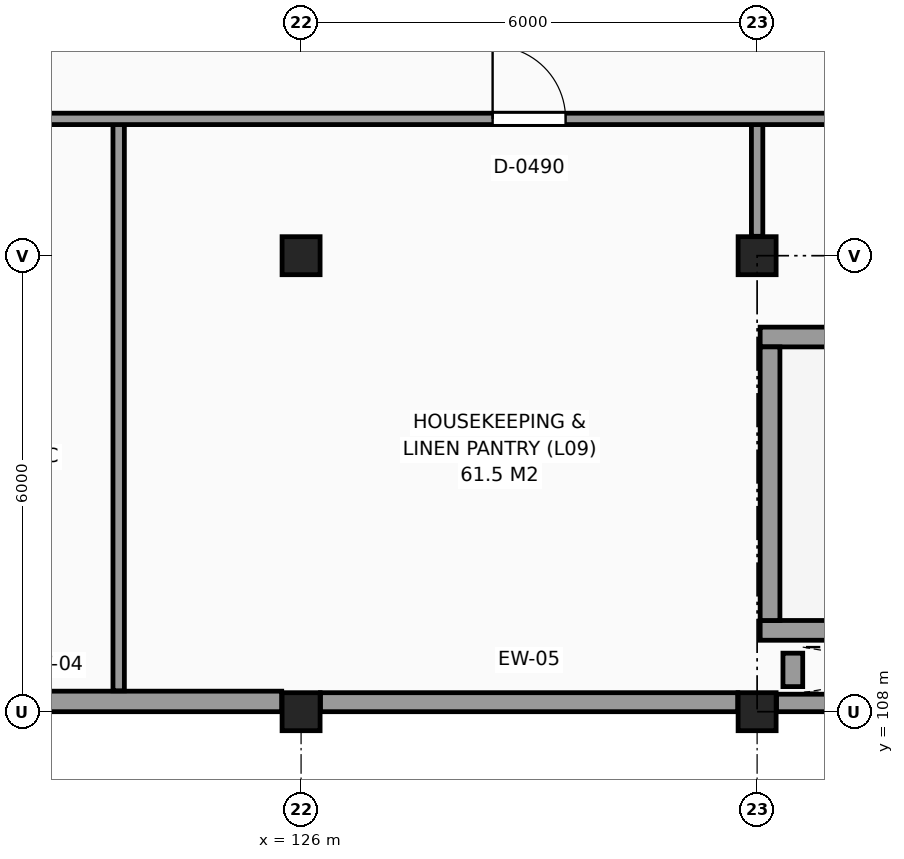
"""IFC4 building model, lengths in metres.
Left out: names, types, materials, properties, quantities, classifications, styles, units other than length and angle.
Written with IfcOpenShell. Run it as: python <this file> out.ifc"""

import sys

from ifc_helpers import new_model, si_unit, direction, frame, frame_2d, origin, origin_2d, place, context, subcontext, project, spatial, rectangle, extrude, element, fill, save


model = new_model("IFC4")
c1 = context("Model", 3, precision=1e-05, world=origin(), true_north=direction((0.0, 1.0)))
c2 = subcontext(c1, "Body", "Model", "MODEL_VIEW")
j1 = project(units=[si_unit("LENGTHUNIT", "METRE"), si_unit("PLANEANGLEUNIT", "RADIAN")], contexts=[c1])
p1 = place(None, origin())
s1 = spatial("IfcSite", under=j1, at=p1, CompositionType="ELEMENT")
p2 = place(p1, origin())
s2 = spatial("IfcBuilding", under=s1, at=p2, CompositionType="ELEMENT")
p3 = place(p2, frame((0.0, 0.0, 38.1)))
s3 = spatial("IfcBuildingStorey", under=s2, at=p3, CompositionType="ELEMENT", Elevation=38.1)
for number, where, z_axis, x_axis in (
    (1, (126.0, 108.0, 0.0), (0.0, 0.0, 1.0), (1.0, 0.0, 0.0)),
    (2, (126.0, 114.0, 0.0), (0.0, 0.0, 1.0), (1.0, 0.0, 0.0)),
    (3, (132.0, 108.0, 0.0), (0.0, 0.0, 1.0), (1.0, 0.0, 0.0)),
    (4, (132.0, 114.0, 0.0), (0.0, 0.0, 1.0), (1.0, 0.0, 0.0)),
):
    element("IfcColumn", number, at=place(p3, frame(where, z_axis=z_axis, x_axis=x_axis)), inside=s3, PredefinedType="COLUMN", context=c2, shape_type="SweptSolid", body=[
        extrude(rectangle(XDim=0.5, YDim=0.5, at=origin_2d()), origin(), (0.0, 0.0, 1.0), 3.3),
    ])
p4 = place(p3, frame((120.255, 108.135, 0.0), z_axis=(0.0, 0.0, 1.0), x_axis=(1.0, 0.0, 0.0)))
e5 = element("IfcWall", 5, at=p4, inside=s3, PredefinedType="SOLIDWALL", context=c2, shape_type="SweptSolid", body=[
    extrude(rectangle(XDim=5.49, YDim=0.27, at=frame_2d((2.745, 0.0))), origin(), (0.0, 0.0, 1.0), 2.41),
])
p5 = place(p3, frame((126.255, 108.125, 0.0), z_axis=(0.0, 0.0, 1.0), x_axis=(1.0, 0.0, 0.0)))
e6 = element("IfcWall", 6, at=p5, inside=s3, PredefinedType="SOLIDWALL", context=c2, shape_type="SweptSolid", body=[
    extrude(rectangle(XDim=5.49, YDim=0.25, at=frame_2d((2.745, 0.0))), origin(), (0.0, 0.0, 1.0), 2.41),
])
p6 = place(p3, frame((132.255, 108.115, 0.0), z_axis=(0.0, 0.0, 1.0), x_axis=(1.0, 0.0, 0.0)))
e7 = element("IfcWall", 7, at=p6, inside=s3, PredefinedType="SOLIDWALL", context=c2, shape_type="SweptSolid", body=[
    extrude(rectangle(XDim=5.49, YDim=0.23, at=frame_2d((2.745, 0.0))), origin(), (0.0, 0.0, 1.0), 3.06),
])
for number, where, z_axis, x_axis in (
    (8, (132.04, 109.07, 0.0), (0.0, 0.0, 1.0), (1.0, 0.0, 0.0)),
    (9, (132.04, 112.93, 0.0), (0.0, 0.0, 1.0), (1.0, 0.0, 0.0)),
):
    element("IfcWall", number, at=place(p3, frame(where, z_axis=z_axis, x_axis=x_axis)), inside=s3, PredefinedType="SHEAR", context=c2, shape_type="SweptSolid", body=[
        extrude(rectangle(XDim=10.72, YDim=0.26, at=frame_2d((5.36, 0.0))), origin(), (0.0, 0.0, 1.0), 3.3),
    ])
p7 = place(p3, frame((132.17, 109.2, 0.0), z_axis=(0.0, 0.0, 1.0), x_axis=(0.0, 1.0, 0.0)))
e10 = element("IfcWall", 10, at=p7, inside=s3, PredefinedType="SHEAR", context=c2, shape_type="SweptSolid", body=[
    extrude(rectangle(XDim=3.6, YDim=0.26, at=frame_2d((1.8, 0.0))), origin(), (0.0, 0.0, 1.0), 3.3),
])
p8 = place(p3, frame((132.47, 108.33, 0.0), z_axis=(0.0, 0.0, 1.0), x_axis=(0.0, 1.0, 0.0)))
e11 = element("IfcWall", 11, at=p8, inside=s3, PredefinedType="SHEAR", context=c2, shape_type="SweptSolid", body=[
    extrude(rectangle(XDim=0.44, YDim=0.26, at=frame_2d((0.22, 0.0))), origin(), (0.0, 0.0, 1.0), 3.3),
])
p9 = place(p3, frame((123.6, 108.275, 0.0), z_axis=(0.0, 0.0, 1.0), x_axis=(0.0, 1.0, 0.0)))
e12 = element("IfcWall", 12, at=p9, inside=s3, PredefinedType="PARTITIONING", context=c2, shape_type="SweptSolid", body=[
    extrude(rectangle(XDim=7.525, YDim=0.15, at=frame_2d((3.763, 0.0))), origin(), (0.0, 0.0, 1.0), 3.06),
])
p10 = place(p3, frame((132.0, 114.255, 0.0), z_axis=(0.0, 0.0, 1.0), x_axis=(0.0, 1.0, 0.0)))
e13 = element("IfcWall", 13, at=p10, inside=s3, PredefinedType="PARTITIONING", context=c2, shape_type="SweptSolid", body=[
    extrude(rectangle(XDim=1.545, YDim=0.15, at=frame_2d((0.772, 0.0))), origin(), (0.0, 0.0, 1.0), 2.26),
])
p11 = place(p3, frame((102.215, 115.8, 0.0), z_axis=(0.0, 0.0, 1.0), x_axis=(1.0, 0.0, 0.0)))
e14 = element("IfcWall", 14, at=p11, inside=s3, PredefinedType="PARTITIONING", context=c2, shape_type="SweptSolid", body=[
    extrude(rectangle(XDim=67.585, YDim=0.15, at=frame_2d((33.792, 0.0))), origin(), (0.0, 0.0, 1.0), 3.06),
])
p12 = place(p11, frame((44.185, 0.0, 0.0)))
e15 = element("IfcOpeningElement", 15, at=p12, cuts=e14, PredefinedType="OPENING", context=c2, shape_type="SweptSolid", body=[
    extrude(rectangle(XDim=1.2, YDim=2.2, at=frame_2d((0.6, 1.1))), frame((0.0, 0.085, 0.0), z_axis=(0.0, -1.0, 0.0), x_axis=(1.0, 0.0, 0.0)), (0.0, 0.0, 1.0), 0.17),
])
p13 = place(p11, frame((14.185, 0.0, 0.0)))
e16 = element("IfcOpeningElement", 16, at=p13, cuts=e14, PredefinedType="OPENING", context=c2, shape_type="SweptSolid", body=[
    extrude(rectangle(XDim=1.2, YDim=2.2, at=frame_2d((0.6, 1.1))), frame((0.0, 0.085, 0.0), z_axis=(0.0, -1.0, 0.0), x_axis=(1.0, 0.0, 0.0)), (0.0, 0.0, 1.0), 0.17),
])
p14 = place(p11, frame((19.335, 0.0, 0.0)))
e17 = element("IfcOpeningElement", 17, at=p14, cuts=e14, PredefinedType="OPENING", context=c2, shape_type="SweptSolid", body=[
    extrude(rectangle(XDim=1.0, YDim=2.15, at=frame_2d((0.5, 1.075))), frame((0.0, 0.085, 0.0), z_axis=(0.0, -1.0, 0.0), x_axis=(1.0, 0.0, 0.0)), (0.0, 0.0, 1.0), 0.17),
])
p15 = place(p11, frame((26.305, 0.0, 0.0)))
e18 = element("IfcOpeningElement", 18, at=p15, cuts=e14, PredefinedType="OPENING", context=c2, shape_type="SweptSolid", body=[
    extrude(rectangle(XDim=0.96, YDim=2.15, at=frame_2d((0.48, 1.075))), frame((0.0, 0.085, 0.0), z_axis=(0.0, -1.0, 0.0), x_axis=(1.0, 0.0, 0.0)), (0.0, 0.0, 1.0), 0.17),
])
p16 = place(p11, frame((48.51, 0.0, 0.0)))
e19 = element("IfcOpeningElement", 19, at=p16, cuts=e14, PredefinedType="OPENING", context=c2, shape_type="SweptSolid", body=[
    extrude(rectangle(XDim=0.95, YDim=2.1, at=frame_2d((0.475, 1.05))), frame((0.0, 0.085, 0.0), z_axis=(0.0, -1.0, 0.0), x_axis=(1.0, 0.0, 0.0)), (0.0, 0.0, 1.0), 0.17),
])
p17 = place(p15, origin())
e20 = element("IfcDoor", 20, at=p17, inside=s3, OperationType="SINGLE_SWING_LEFT", PredefinedType="DOOR", context=c2, shape_type="SweptSolid", body=[
    extrude(rectangle(XDim=0.96, YDim=2.15, at=frame_2d((0.48, 1.075))), frame((0.0, 0.025, 0.0), z_axis=(0.0, -1.0, 0.0), x_axis=(1.0, 0.0, 0.0)), (0.0, 0.0, 1.0), 0.05),
])
fill(e18, e20)
save(model, sys.argv[1])
